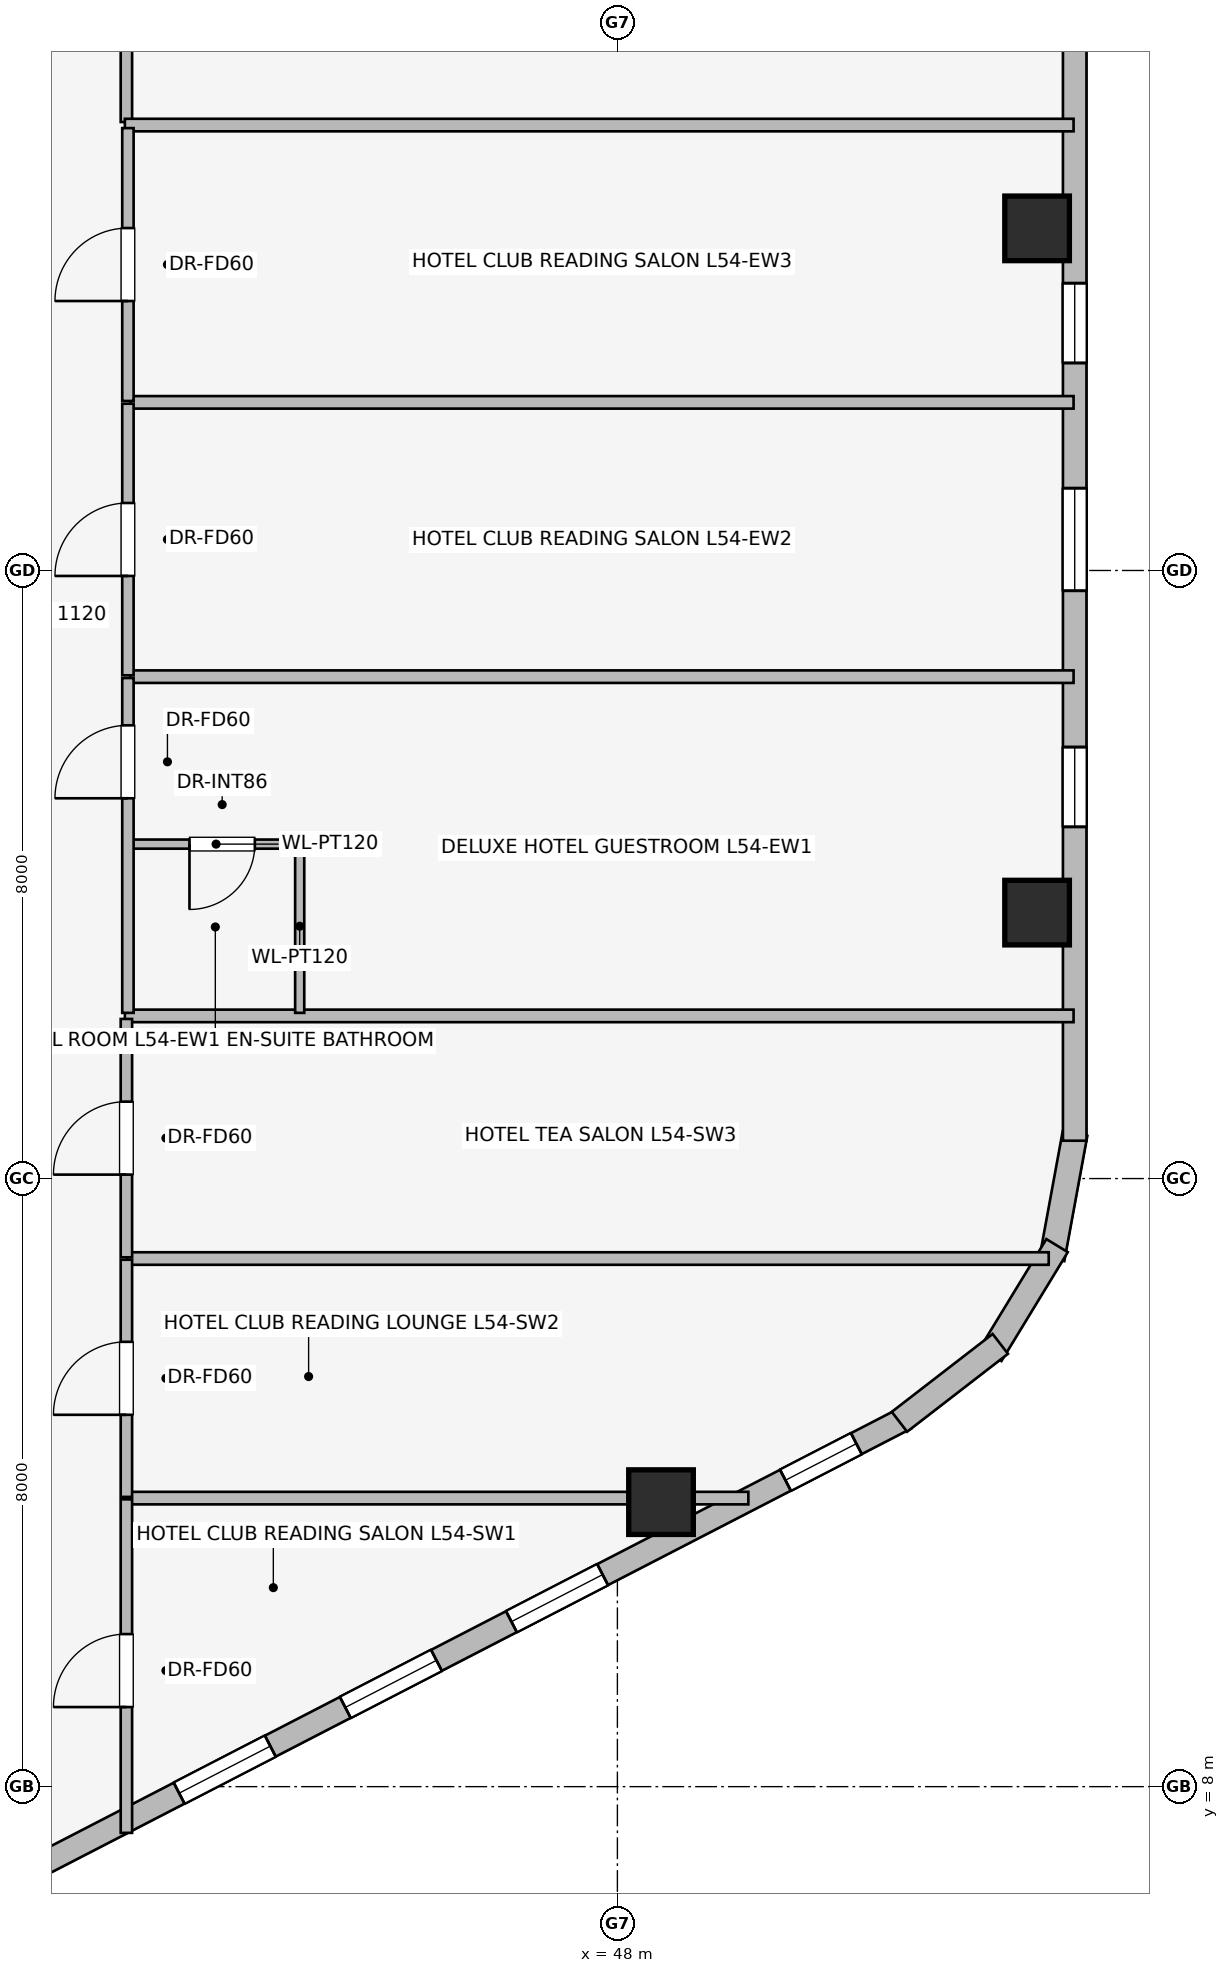
"""IFC4 building model, lengths in metres.
Left out: names, types, materials, properties, quantities, classifications, styles, units other than length and angle.
Written with IfcOpenShell. Run it as: python <this file> out.ifc"""

import sys

from ifc_helpers import new_model, si_unit, direction, frame, frame_2d, origin, origin_2d, place, context, subcontext, project, spatial, rectangle, extrude, element, fill, save


model = new_model("IFC4")
c1 = context("Model", 3, precision=1e-05, world=origin(), true_north=direction((0.0, 1.0)))
c2 = subcontext(c1, "Body", "Model", "MODEL_VIEW")
j1 = project(units=[si_unit("LENGTHUNIT", "METRE"), si_unit("PLANEANGLEUNIT", "RADIAN")], contexts=[c1])
p1 = place(None, origin())
s1 = spatial("IfcSite", under=j1, at=p1, CompositionType="ELEMENT")
p2 = place(p1, origin())
s2 = spatial("IfcBuilding", under=s1, at=p2, CompositionType="ELEMENT")
p3 = place(p2, frame((0.0, 0.0, 199.9)))
s3 = spatial("IfcBuildingStorey", under=s2, at=p3, CompositionType="ELEMENT", Elevation=199.9)
for number, where, z_axis, x_axis in (
    (1, (48.574, 11.743, 0.0), (0.0, 0.0, 1.0), (1.0, 0.0, 0.0)),
    (2, (53.522, 19.499, 0.0), (0.0, 0.0, 1.0), (1.0, 0.0, 0.0)),
    (3, (53.522, 28.501, 0.0), (0.0, 0.0, 1.0), (1.0, 0.0, 0.0)),
):
    element("IfcColumn", number, at=place(p3, frame(where, z_axis=z_axis, x_axis=x_axis)), inside=s3, PredefinedType="COLUMN", context=c2, shape_type="SweptSolid", body=[
        extrude(rectangle(XDim=0.85, YDim=0.85, at=origin_2d()), origin(), (0.0, 0.0, 1.0), 3.45),
    ])
p4 = place(p3, frame((51.792, 12.847, 0.0), z_axis=(0.0, 0.0, 1.0), x_axis=(-0.888626188278, -0.458632202867, 0.0)))
e4 = element("IfcWall", 4, at=p4, inside=s3, PredefinedType="STANDARD", context=c2, shape_type="SweptSolid", body=[
    extrude(rectangle(XDim=16.828, YDim=0.31, at=frame_2d((8.414, 0.0))), origin(), (0.0, 0.0, 1.0), 3.19),
])
p5 = place(p4, frame((0.729, 0.0, 0.75)))
e5 = element("IfcOpeningElement", 5, at=p5, cuts=e4, PredefinedType="OPENING", context=c2, shape_type="SweptSolid", body=[
    extrude(rectangle(XDim=1.05, YDim=1.4, at=frame_2d((0.525, 0.7))), frame((0.0, 0.165, 0.0), z_axis=(0.0, -1.0, 0.0), x_axis=(1.0, 0.0, 0.0)), (0.0, 0.0, 1.0), 0.33),
])
p6 = place(p4, frame((4.486, 0.0, 0.75)))
e6 = element("IfcOpeningElement", 6, at=p6, cuts=e4, PredefinedType="OPENING", context=c2, shape_type="SweptSolid", body=[
    extrude(rectangle(XDim=1.35, YDim=1.45, at=frame_2d((0.675, 0.725))), frame((0.0, 0.165, 0.0), z_axis=(0.0, -1.0, 0.0), x_axis=(1.0, 0.0, 0.0)), (0.0, 0.0, 1.0), 0.33),
])
p7 = place(p4, frame((6.946, 0.0, 0.75)))
e7 = element("IfcOpeningElement", 7, at=p7, cuts=e4, PredefinedType="OPENING", context=c2, shape_type="SweptSolid", body=[
    extrude(rectangle(XDim=1.35, YDim=1.45, at=frame_2d((0.675, 0.725))), frame((0.0, 0.165, 0.0), z_axis=(0.0, -1.0, 0.0), x_axis=(1.0, 0.0, 0.0)), (0.0, 0.0, 1.0), 0.33),
])
p8 = place(p4, frame((9.406, 0.0, 0.75)))
e8 = element("IfcOpeningElement", 8, at=p8, cuts=e4, PredefinedType="OPENING", context=c2, shape_type="SweptSolid", body=[
    extrude(rectangle(XDim=1.35, YDim=1.45, at=frame_2d((0.675, 0.725))), frame((0.0, 0.165, 0.0), z_axis=(0.0, -1.0, 0.0), x_axis=(1.0, 0.0, 0.0)), (0.0, 0.0, 1.0), 0.33),
])
p9 = place(p4, frame((14.153, 0.0, 0.75)))
e9 = element("IfcOpeningElement", 9, at=p9, cuts=e4, PredefinedType="OPENING", context=c2, shape_type="SweptSolid", body=[
    extrude(rectangle(XDim=2.0, YDim=1.5, at=frame_2d((1.0, 0.75))), frame((0.0, 0.165, 0.0), z_axis=(0.0, -1.0, 0.0), x_axis=(1.0, 0.0, 0.0)), (0.0, 0.0, 1.0), 0.33),
])
p10 = place(p3, frame((54.021, 16.592, 0.0), z_axis=(0.0, 0.0, 1.0), x_axis=(-0.180717642671, -0.983535019014, 0.0)))
e10 = element("IfcWall", 10, at=p10, inside=s3, PredefinedType="STANDARD", context=c2, shape_type="SweptSolid", body=[
    extrude(rectangle(XDim=1.677, YDim=0.33, at=frame_2d((0.838, 0.0))), origin(), (0.0, 0.0, 1.0), 3.19),
])
p11 = place(p3, frame((53.785, 15.118, 0.0), z_axis=(0.0, 0.0, 1.0), x_axis=(-0.520219286058, -0.85403272444, 0.0)))
e11 = element("IfcWall", 11, at=p11, inside=s3, PredefinedType="STANDARD", context=c2, shape_type="SweptSolid", body=[
    extrude(rectangle(XDim=1.678, YDim=0.33, at=frame_2d((0.839, 0.0))), origin(), (0.0, 0.0, 1.0), 3.19),
])
p12 = place(p3, frame((53.038, 13.825, 0.0), z_axis=(0.0, 0.0, 1.0), x_axis=(-0.791464279355, -0.611215423976, 0.0)))
e12 = element("IfcWall", 12, at=p12, inside=s3, PredefinedType="STANDARD", context=c2, shape_type="SweptSolid", body=[
    extrude(rectangle(XDim=1.677, YDim=0.33, at=frame_2d((0.838, 0.0))), origin(), (0.0, 0.0, 1.0), 3.19),
])
p13 = place(p3, frame((54.017, 31.502, 0.0), z_axis=(0.0, 0.0, 1.0), x_axis=(0.0, -1.0, 0.0)))
e13 = element("IfcWall", 13, at=p13, inside=s3, PredefinedType="STANDARD", context=c2, shape_type="SweptSolid", body=[
    extrude(rectangle(XDim=15.004, YDim=0.31, at=frame_2d((7.502, 0.0))), origin(), (0.0, 0.0, 1.0), 3.19),
])
p14 = place(p13, frame((3.722, 0.0, 0.75)))
e14 = element("IfcOpeningElement", 14, at=p14, cuts=e13, PredefinedType="OPENING", context=c2, shape_type="SweptSolid", body=[
    extrude(rectangle(XDim=1.05, YDim=1.4, at=frame_2d((0.525, 0.7))), frame((0.0, 0.165, 0.0), z_axis=(0.0, -1.0, 0.0), x_axis=(1.0, 0.0, 0.0)), (0.0, 0.0, 1.0), 0.33),
])
p15 = place(p13, frame((6.419, 0.0, 0.75)))
e15 = element("IfcOpeningElement", 15, at=p15, cuts=e13, PredefinedType="OPENING", context=c2, shape_type="SweptSolid", body=[
    extrude(rectangle(XDim=1.35, YDim=1.45, at=frame_2d((0.675, 0.725))), frame((0.0, 0.165, 0.0), z_axis=(0.0, -1.0, 0.0), x_axis=(1.0, 0.0, 0.0)), (0.0, 0.0, 1.0), 0.33),
])
p16 = place(p13, frame((9.825, 0.0, 0.75)))
e16 = element("IfcOpeningElement", 16, at=p16, cuts=e13, PredefinedType="OPENING", context=c2, shape_type="SweptSolid", body=[
    extrude(rectangle(XDim=1.05, YDim=1.4, at=frame_2d((0.525, 0.7))), frame((0.0, 0.165, 0.0), z_axis=(0.0, -1.0, 0.0), x_axis=(1.0, 0.0, 0.0)), (0.0, 0.0, 1.0), 0.33),
])
p17 = place(p3, frame((41.54, 40.275, 0.0), z_axis=(0.0, 0.0, 1.0), x_axis=(0.0, -1.0, 0.0)))
e17 = element("IfcWall", 17, at=p17, inside=s3, PredefinedType="PARTITIONING", context=c2, shape_type="SweptSolid", body=[
    extrude(rectangle(XDim=10.375, YDim=0.15, at=frame_2d((5.188, 0.0))), origin(), (0.0, 0.0, 1.0), 3.19),
])
p18 = place(p17, frame((4.745, 0.0, 0.0)))
e18 = element("IfcOpeningElement", 18, at=p18, cuts=e17, PredefinedType="OPENING", context=c2, shape_type="SweptSolid", body=[
    extrude(rectangle(XDim=0.96, YDim=2.0, at=frame_2d((0.48, 1.0))), frame((0.0, 0.085, 0.0), z_axis=(0.0, -1.0, 0.0), x_axis=(1.0, 0.0, 0.0)), (0.0, 0.0, 1.0), 0.17),
])
for number, where, z_axis, x_axis in (
    (19, (41.52, 18.14, 0.0), (0.0, 0.0, 1.0), (1.0, 0.0, 0.0)),
    (20, (41.52, 29.86, 0.0), (0.0, 0.0, 1.0), (1.0, 0.0, 0.0)),
):
    element("IfcWall", number, at=place(p3, frame(where, z_axis=z_axis, x_axis=x_axis)), inside=s3, PredefinedType="PARTITIONING", context=c2, shape_type="SweptSolid", body=[
        extrude(rectangle(XDim=12.482, YDim=0.165, at=frame_2d((6.241, 0.0))), origin(), (0.0, 0.0, 1.0), 3.19),
    ])
for number, where, z_axis, x_axis in (
    (21, (41.59, 22.603, 0.0), (0.0, 0.0, 1.0), (1.0, 0.0, 0.0)),
    (22, (41.59, 26.212, 0.0), (0.0, 0.0, 1.0), (1.0, 0.0, 0.0)),
):
    element("IfcWall", number, at=place(p3, frame(where, z_axis=z_axis, x_axis=x_axis)), inside=s3, PredefinedType="PARTITIONING", context=c2, shape_type="SweptSolid", body=[
        extrude(rectangle(XDim=12.412, YDim=0.165, at=frame_2d((6.206, 0.0))), origin(), (0.0, 0.0, 1.0), 3.19),
    ])
p19 = place(p3, frame((43.82, 18.18, 0.0), z_axis=(0.0, 0.0, 1.0), x_axis=(0.0, 1.0, 0.0)))
e23 = element("IfcWall", 23, at=p19, inside=s3, PredefinedType="PARTITIONING", context=c2, shape_type="SweptSolid", body=[
    extrude(rectangle(XDim=2.28, YDim=0.12, at=frame_2d((1.14, 0.0))), origin(), (0.0, 0.0, 1.0), 3.19),
])
p20 = place(p3, frame((43.88, 20.4, 0.0), z_axis=(0.0, 0.0, 1.0), x_axis=(-1.0, 0.0, 0.0)))
e24 = element("IfcWall", 24, at=p20, inside=s3, PredefinedType="PARTITIONING", context=c2, shape_type="SweptSolid", body=[
    extrude(rectangle(XDim=2.32, YDim=0.12, at=frame_2d((1.16, 0.0))), origin(), (0.0, 0.0, 1.0), 3.19),
])
p21 = place(p20, frame((0.65, 0.0, 0.0)))
e25 = element("IfcOpeningElement", 25, at=p21, cuts=e24, PredefinedType="OPENING", context=c2, shape_type="SweptSolid", body=[
    extrude(rectangle(XDim=0.86, YDim=2.0, at=frame_2d((0.43, 1.0))), frame((0.0, 0.07, 0.0), z_axis=(0.0, -1.0, 0.0), x_axis=(1.0, 0.0, 0.0)), (0.0, 0.0, 1.0), 0.14),
])
p22 = place(p3, frame((41.56, 18.18, 0.0), z_axis=(0.0, 0.0, 1.0), x_axis=(0.0, 1.0, 0.0)))
e26 = element("IfcWall", 26, at=p22, inside=s3, PredefinedType="PARTITIONING", context=c2, shape_type="SweptSolid", body=[
    extrude(rectangle(XDim=4.405, YDim=0.15, at=frame_2d((2.203, 0.0))), origin(), (0.0, 0.0, 1.0), 3.19),
])
p23 = place(p22, frame((2.823, 0.0, 0.0)))
e27 = element("IfcOpeningElement", 27, at=p23, cuts=e26, PredefinedType="OPENING", context=c2, shape_type="SweptSolid", body=[
    extrude(rectangle(XDim=0.96, YDim=2.0, at=frame_2d((0.48, 1.0))), frame((0.0, 0.085, 0.0), z_axis=(0.0, -1.0, 0.0), x_axis=(1.0, 0.0, 0.0)), (0.0, 0.0, 1.0), 0.17),
])
p24 = place(p3, frame((41.56, 22.621, 0.0), z_axis=(0.0, 0.0, 1.0), x_axis=(0.0, 1.0, 0.0)))
e28 = element("IfcWall", 28, at=p24, inside=s3, PredefinedType="PARTITIONING", context=c2, shape_type="SweptSolid", body=[
    extrude(rectangle(XDim=3.573, YDim=0.15, at=frame_2d((1.787, 0.0))), origin(), (0.0, 0.0, 1.0), 3.19),
])
p25 = place(p24, frame((1.307, 0.0, 0.0)))
e29 = element("IfcOpeningElement", 29, at=p25, cuts=e28, PredefinedType="OPENING", context=c2, shape_type="SweptSolid", body=[
    extrude(rectangle(XDim=0.96, YDim=2.0, at=frame_2d((0.48, 1.0))), frame((0.0, 0.085, 0.0), z_axis=(0.0, -1.0, 0.0), x_axis=(1.0, 0.0, 0.0)), (0.0, 0.0, 1.0), 0.17),
])
p26 = place(p3, frame((41.56, 26.23, 0.0), z_axis=(0.0, 0.0, 1.0), x_axis=(0.0, 1.0, 0.0)))
e30 = element("IfcWall", 30, at=p26, inside=s3, PredefinedType="PARTITIONING", context=c2, shape_type="SweptSolid", body=[
    extrude(rectangle(XDim=3.59, YDim=0.15, at=frame_2d((1.795, 0.0))), origin(), (0.0, 0.0, 1.0), 3.19),
])
p27 = place(p26, frame((1.315, 0.0, 0.0)))
e31 = element("IfcOpeningElement", 31, at=p27, cuts=e30, PredefinedType="OPENING", context=c2, shape_type="SweptSolid", body=[
    extrude(rectangle(XDim=0.96, YDim=2.0, at=frame_2d((0.48, 1.0))), frame((0.0, 0.085, 0.0), z_axis=(0.0, -1.0, 0.0), x_axis=(1.0, 0.0, 0.0)), (0.0, 0.0, 1.0), 0.17),
])
p28 = place(p3, frame((41.55, 11.796, 0.0), z_axis=(0.0, 0.0, 1.0), x_axis=(1.0, 0.0, 0.0)))
e32 = element("IfcWall", 32, at=p28, inside=s3, PredefinedType="PARTITIONING", context=c2, shape_type="SweptSolid", body=[
    extrude(rectangle(XDim=8.173, YDim=0.165, at=frame_2d((4.086, 0.0))), origin(), (0.0, 0.0, 1.0), 3.19),
])
p29 = place(p3, frame((41.55, 14.948, 0.0), z_axis=(0.0, 0.0, 1.0), x_axis=(1.0, 0.0, 0.0)))
e33 = element("IfcWall", 33, at=p29, inside=s3, PredefinedType="PARTITIONING", context=c2, shape_type="SweptSolid", body=[
    extrude(rectangle(XDim=12.125, YDim=0.165, at=frame_2d((6.062, 0.0))), origin(), (0.0, 0.0, 1.0), 3.19),
])
p30 = place(p3, frame((41.54, 7.392, 0.0), z_axis=(0.0, 0.0, 1.0), x_axis=(0.0, 1.0, 0.0)))
e34 = element("IfcWall", 34, at=p30, inside=s3, PredefinedType="PARTITIONING", context=c2, shape_type="SweptSolid", body=[
    extrude(rectangle(XDim=4.388, YDim=0.15, at=frame_2d((2.194, 0.0))), origin(), (0.0, 0.0, 1.0), 3.19),
])
p31 = place(p30, frame((1.655, 0.0, 0.0)))
e35 = element("IfcOpeningElement", 35, at=p31, cuts=e34, PredefinedType="OPENING", context=c2, shape_type="SweptSolid", body=[
    extrude(rectangle(XDim=0.96, YDim=2.0, at=frame_2d((0.48, 1.0))), frame((0.0, 0.085, 0.0), z_axis=(0.0, -1.0, 0.0), x_axis=(1.0, 0.0, 0.0)), (0.0, 0.0, 1.0), 0.17),
])
p32 = place(p3, frame((41.54, 11.812, 0.0), z_axis=(0.0, 0.0, 1.0), x_axis=(0.0, 1.0, 0.0)))
e36 = element("IfcWall", 36, at=p32, inside=s3, PredefinedType="PARTITIONING", context=c2, shape_type="SweptSolid", body=[
    extrude(rectangle(XDim=3.12, YDim=0.15, at=frame_2d((1.56, 0.0))), origin(), (0.0, 0.0, 1.0), 3.19),
])
p33 = place(p32, frame((1.08, 0.0, 0.0)))
e37 = element("IfcOpeningElement", 37, at=p33, cuts=e36, PredefinedType="OPENING", context=c2, shape_type="SweptSolid", body=[
    extrude(rectangle(XDim=0.96, YDim=2.0, at=frame_2d((0.48, 1.0))), frame((0.0, 0.085, 0.0), z_axis=(0.0, -1.0, 0.0), x_axis=(1.0, 0.0, 0.0)), (0.0, 0.0, 1.0), 0.17),
])
p34 = place(p3, frame((41.54, 14.964, 0.0), z_axis=(0.0, 0.0, 1.0), x_axis=(0.0, 1.0, 0.0)))
e38 = element("IfcWall", 38, at=p34, inside=s3, PredefinedType="PARTITIONING", context=c2, shape_type="SweptSolid", body=[
    extrude(rectangle(XDim=3.136, YDim=0.15, at=frame_2d((1.568, 0.0))), origin(), (0.0, 0.0, 1.0), 3.19),
])
p35 = place(p34, frame((1.088, 0.0, 0.0)))
e39 = element("IfcOpeningElement", 39, at=p35, cuts=e38, PredefinedType="OPENING", context=c2, shape_type="SweptSolid", body=[
    extrude(rectangle(XDim=0.96, YDim=2.0, at=frame_2d((0.48, 1.0))), frame((0.0, 0.085, 0.0), z_axis=(0.0, -1.0, 0.0), x_axis=(1.0, 0.0, 0.0)), (0.0, 0.0, 1.0), 0.17),
])
p36 = place(p5, origin())
e40 = element("IfcWindow", 40, at=p36, inside=s3, PartitioningType="SINGLE_PANEL", PredefinedType="WINDOW", context=c2, shape_type="SweptSolid", body=[
    extrude(rectangle(XDim=1.05, YDim=1.4, at=frame_2d((0.525, 0.7))), frame((0.0, 0.03, 0.0), z_axis=(0.0, -1.0, 0.0), x_axis=(1.0, 0.0, 0.0)), (0.0, 0.0, 1.0), 0.06),
])
fill(e5, e40)
p37 = place(p6, origin())
e41 = element("IfcWindow", 41, at=p37, inside=s3, PartitioningType="SINGLE_PANEL", PredefinedType="WINDOW", context=c2, shape_type="SweptSolid", body=[
    extrude(rectangle(XDim=1.35, YDim=1.45, at=frame_2d((0.675, 0.725))), frame((0.0, 0.03, 0.0), z_axis=(0.0, -1.0, 0.0), x_axis=(1.0, 0.0, 0.0)), (0.0, 0.0, 1.0), 0.06),
])
fill(e6, e41)
p38 = place(p7, origin())
e42 = element("IfcWindow", 42, at=p38, inside=s3, PartitioningType="SINGLE_PANEL", PredefinedType="WINDOW", context=c2, shape_type="SweptSolid", body=[
    extrude(rectangle(XDim=1.35, YDim=1.45, at=frame_2d((0.675, 0.725))), frame((0.0, 0.03, 0.0), z_axis=(0.0, -1.0, 0.0), x_axis=(1.0, 0.0, 0.0)), (0.0, 0.0, 1.0), 0.06),
])
fill(e7, e42)
p39 = place(p8, origin())
e43 = element("IfcWindow", 43, at=p39, inside=s3, PartitioningType="SINGLE_PANEL", PredefinedType="WINDOW", context=c2, shape_type="SweptSolid", body=[
    extrude(rectangle(XDim=1.35, YDim=1.45, at=frame_2d((0.675, 0.725))), frame((0.0, 0.03, 0.0), z_axis=(0.0, -1.0, 0.0), x_axis=(1.0, 0.0, 0.0)), (0.0, 0.0, 1.0), 0.06),
])
fill(e8, e43)
p40 = place(p14, origin())
e44 = element("IfcWindow", 44, at=p40, inside=s3, PartitioningType="SINGLE_PANEL", PredefinedType="WINDOW", context=c2, shape_type="SweptSolid", body=[
    extrude(rectangle(XDim=1.05, YDim=1.4, at=frame_2d((0.525, 0.7))), frame((0.0, 0.03, 0.0), z_axis=(0.0, -1.0, 0.0), x_axis=(1.0, 0.0, 0.0)), (0.0, 0.0, 1.0), 0.06),
])
fill(e14, e44)
p41 = place(p15, origin())
e45 = element("IfcWindow", 45, at=p41, inside=s3, PartitioningType="SINGLE_PANEL", PredefinedType="WINDOW", context=c2, shape_type="SweptSolid", body=[
    extrude(rectangle(XDim=1.35, YDim=1.45, at=frame_2d((0.675, 0.725))), frame((0.0, 0.03, 0.0), z_axis=(0.0, -1.0, 0.0), x_axis=(1.0, 0.0, 0.0)), (0.0, 0.0, 1.0), 0.06),
])
fill(e15, e45)
p42 = place(p16, origin())
e46 = element("IfcWindow", 46, at=p42, inside=s3, PartitioningType="SINGLE_PANEL", PredefinedType="WINDOW", context=c2, shape_type="SweptSolid", body=[
    extrude(rectangle(XDim=1.05, YDim=1.4, at=frame_2d((0.525, 0.7))), frame((0.0, 0.03, 0.0), z_axis=(0.0, -1.0, 0.0), x_axis=(1.0, 0.0, 0.0)), (0.0, 0.0, 1.0), 0.06),
])
fill(e16, e46)
p43 = place(p21, origin())
e47 = element("IfcDoor", 47, at=p43, inside=s3, OperationType="SINGLE_SWING_RIGHT", PredefinedType="DOOR", context=c2, shape_type="SweptSolid", body=[
    extrude(rectangle(XDim=0.86, YDim=2.0, at=frame_2d((0.43, 1.0))), frame((0.0, 0.025, 0.0), z_axis=(0.0, -1.0, 0.0), x_axis=(1.0, 0.0, 0.0)), (0.0, 0.0, 1.0), 0.05),
])
fill(e25, e47)
p44 = place(p23, origin())
e48 = element("IfcDoor", 48, at=p44, inside=s3, OperationType="SINGLE_SWING_LEFT", PredefinedType="DOOR", context=c2, shape_type="SweptSolid", body=[
    extrude(rectangle(XDim=0.96, YDim=2.0, at=frame_2d((0.48, 1.0))), frame((0.0, 0.025, 0.0), z_axis=(0.0, -1.0, 0.0), x_axis=(1.0, 0.0, 0.0)), (0.0, 0.0, 1.0), 0.05),
])
fill(e27, e48)
p45 = place(p25, origin())
e49 = element("IfcDoor", 49, at=p45, inside=s3, OperationType="SINGLE_SWING_LEFT", PredefinedType="DOOR", context=c2, shape_type="SweptSolid", body=[
    extrude(rectangle(XDim=0.96, YDim=2.0, at=frame_2d((0.48, 1.0))), frame((0.0, 0.025, 0.0), z_axis=(0.0, -1.0, 0.0), x_axis=(1.0, 0.0, 0.0)), (0.0, 0.0, 1.0), 0.05),
])
fill(e29, e49)
p46 = place(p27, origin())
e50 = element("IfcDoor", 50, at=p46, inside=s3, OperationType="SINGLE_SWING_LEFT", PredefinedType="DOOR", context=c2, shape_type="SweptSolid", body=[
    extrude(rectangle(XDim=0.96, YDim=2.0, at=frame_2d((0.48, 1.0))), frame((0.0, 0.025, 0.0), z_axis=(0.0, -1.0, 0.0), x_axis=(1.0, 0.0, 0.0)), (0.0, 0.0, 1.0), 0.05),
])
fill(e31, e50)
p47 = place(p31, origin())
e51 = element("IfcDoor", 51, at=p47, inside=s3, OperationType="SINGLE_SWING_LEFT", PredefinedType="DOOR", context=c2, shape_type="SweptSolid", body=[
    extrude(rectangle(XDim=0.96, YDim=2.0, at=frame_2d((0.48, 1.0))), frame((0.0, 0.025, 0.0), z_axis=(0.0, -1.0, 0.0), x_axis=(1.0, 0.0, 0.0)), (0.0, 0.0, 1.0), 0.05),
])
fill(e35, e51)
p48 = place(p33, origin())
e52 = element("IfcDoor", 52, at=p48, inside=s3, OperationType="SINGLE_SWING_LEFT", PredefinedType="DOOR", context=c2, shape_type="SweptSolid", body=[
    extrude(rectangle(XDim=0.96, YDim=2.0, at=frame_2d((0.48, 1.0))), frame((0.0, 0.025, 0.0), z_axis=(0.0, -1.0, 0.0), x_axis=(1.0, 0.0, 0.0)), (0.0, 0.0, 1.0), 0.05),
])
fill(e37, e52)
p49 = place(p35, origin())
e53 = element("IfcDoor", 53, at=p49, inside=s3, OperationType="SINGLE_SWING_LEFT", PredefinedType="DOOR", context=c2, shape_type="SweptSolid", body=[
    extrude(rectangle(XDim=0.96, YDim=2.0, at=frame_2d((0.48, 1.0))), frame((0.0, 0.025, 0.0), z_axis=(0.0, -1.0, 0.0), x_axis=(1.0, 0.0, 0.0)), (0.0, 0.0, 1.0), 0.05),
])
fill(e39, e53)
save(model, sys.argv[1])
